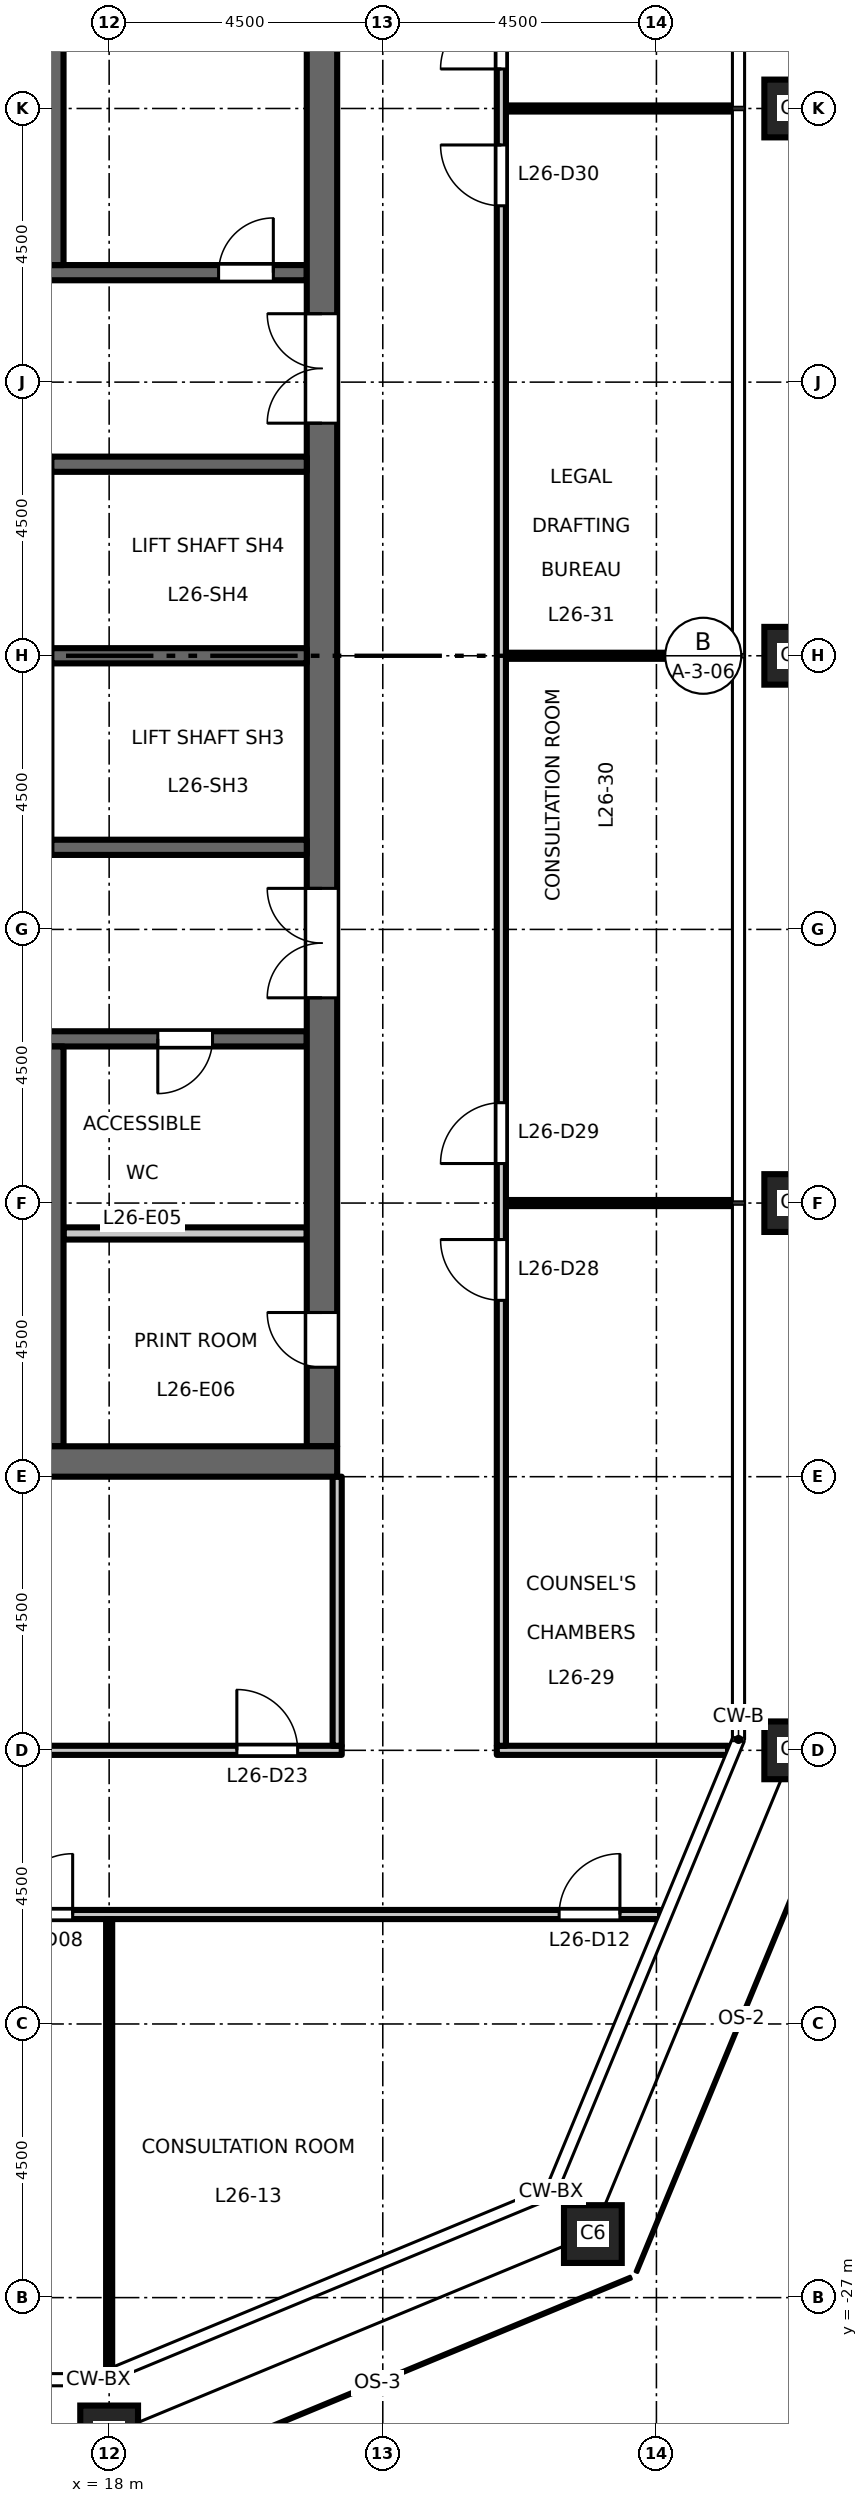
"""IFC4 building model, lengths in metres.
Left out: names, types, materials, properties, quantities, classifications, styles, units other than length and angle.
Written with IfcOpenShell. Run it as: python <this file> out.ifc"""

import sys

from ifc_helpers import new_model, si_unit, direction, frame, frame_2d, origin, origin_2d, place, context, subcontext, project, spatial, rectangle, hollow_rectangle, extrude, element, fill, save


model = new_model("IFC4")
c1 = context("Model", 3, precision=1e-05, world=origin(), true_north=direction((0.0, 1.0)))
c2 = subcontext(c1, "Body", "Model", "MODEL_VIEW")
j1 = project(units=[si_unit("LENGTHUNIT", "METRE"), si_unit("PLANEANGLEUNIT", "RADIAN")], contexts=[c1])
p1 = place(None, origin())
s1 = spatial("IfcSite", under=j1, at=p1, CompositionType="ELEMENT")
p2 = place(p1, origin())
s2 = spatial("IfcBuilding", under=s1, at=p2, CompositionType="ELEMENT")
p3 = place(p2, frame((0.0, 0.0, 122.7)))
s3 = spatial("IfcBuildingStorey", under=s2, at=p3, CompositionType="ELEMENT", Elevation=122.7)
for number, where, z_axis, x_axis in (
    (1, (18.0, -29.25, 0.0), (0.0, 0.0, 1.0), (1.0, 0.0, 0.0)),
    (2, (25.955, -25.955, 0.0), (0.0, 0.0, 1.0), (1.0, 0.0, 0.0)),
    (3, (29.25, -18.0, 0.0), (0.0, 0.0, 1.0), (1.0, 0.0, 0.0)),
    (4, (29.25, -9.0, 0.0), (0.0, 0.0, 1.0), (1.0, 0.0, 0.0)),
    (5, (29.25, 0.0, 0.0), (0.0, 0.0, 1.0), (1.0, 0.0, 0.0)),
    (6, (29.25, 9.0, 0.0), (0.0, 0.0, 1.0), (1.0, 0.0, 0.0)),
):
    element("IfcColumn", number, at=place(p3, frame(where, z_axis=z_axis, x_axis=x_axis)), inside=s3, PredefinedType="COLUMN", context=c2, shape_type="SweptSolid", body=[
        extrude(hollow_rectangle(XDim=0.95, YDim=0.95, WallThickness=0.055, at=origin_2d()), origin(), (0.0, 0.0, 1.0), 4.5),
    ])
p4 = place(p3, frame((17.0, 6.3, 0.0), z_axis=(0.0, 0.0, 1.0), x_axis=(1.0, 0.0, 0.0)))
e7 = element("IfcWall", 7, at=p4, inside=s3, PredefinedType="SHEAR", context=c2, shape_type="SweptSolid", body=[
    extrude(rectangle(XDim=4.25, YDim=0.25, at=frame_2d((2.125, 0.0))), origin(), (0.0, 0.0, 1.0), 4.35),
])
p5 = place(p4, frame((2.8, 0.0, 0.0)))
e8 = element("IfcOpeningElement", 8, at=p5, cuts=e7, PredefinedType="OPENING", context=c2, shape_type="SweptSolid", body=[
    extrude(rectangle(XDim=0.9, YDim=2.1, at=frame_2d((0.45, 1.05))), frame((0.0, 0.135, 0.0), z_axis=(0.0, -1.0, 0.0), x_axis=(1.0, 0.0, 0.0)), (0.0, 0.0, 1.0), 0.27),
])
p6 = place(p3, frame((12.15, -6.3, 0.0), z_axis=(0.0, 0.0, 1.0), x_axis=(1.0, 0.0, 0.0)))
e9 = element("IfcWall", 9, at=p6, inside=s3, PredefinedType="SHEAR", context=c2, shape_type="SweptSolid", body=[
    extrude(rectangle(XDim=9.1, YDim=0.25, at=frame_2d((4.55, 0.0))), origin(), (0.0, 0.0, 1.0), 4.35),
])
p7 = place(p6, frame((1.8, 0.0, 0.0)))
e10 = element("IfcOpeningElement", 10, at=p7, cuts=e9, PredefinedType="OPENING", context=c2, shape_type="SweptSolid", body=[
    extrude(rectangle(XDim=1.0, YDim=2.1, at=frame_2d((0.5, 1.05))), frame((0.0, 0.135, 0.0), z_axis=(0.0, -1.0, 0.0), x_axis=(1.0, 0.0, 0.0)), (0.0, 0.0, 1.0), 0.27),
])
p8 = place(p6, frame((6.65, 0.0, 0.0)))
e11 = element("IfcOpeningElement", 11, at=p8, cuts=e9, PredefinedType="OPENING", context=c2, shape_type="SweptSolid", body=[
    extrude(rectangle(XDim=0.9, YDim=2.1, at=frame_2d((0.45, 1.05))), frame((0.0, 0.135, 0.0), z_axis=(0.0, -1.0, 0.0), x_axis=(1.0, 0.0, 0.0)), (0.0, 0.0, 1.0), 0.27),
])
p9 = place(p3, frame((21.5, -13.0, 0.0), z_axis=(0.0, 0.0, 1.0), x_axis=(0.0, 1.0, 0.0)))
e12 = element("IfcWall", 12, at=p9, inside=s3, PredefinedType="SHEAR", context=c2, shape_type="SweptSolid", body=[
    extrude(rectangle(XDim=26.0, YDim=0.5, at=frame_2d((13.0, 0.0))), origin(), (0.0, 0.0, 1.0), 4.35),
])
p10 = place(p9, frame((16.825, 0.0, 0.0)))
e13 = element("IfcOpeningElement", 13, at=p10, cuts=e12, PredefinedType="OPENING", context=c2, shape_type="SweptSolid", body=[
    extrude(rectangle(XDim=1.8, YDim=2.1, at=frame_2d((0.9, 1.05))), frame((0.0, 0.26, 0.0), z_axis=(0.0, -1.0, 0.0), x_axis=(1.0, 0.0, 0.0)), (0.0, 0.0, 1.0), 0.52),
])
p11 = place(p9, frame((7.375, 0.0, 0.0)))
e14 = element("IfcOpeningElement", 14, at=p11, cuts=e12, PredefinedType="OPENING", context=c2, shape_type="SweptSolid", body=[
    extrude(rectangle(XDim=1.8, YDim=2.1, at=frame_2d((0.9, 1.05))), frame((0.0, 0.26, 0.0), z_axis=(0.0, -1.0, 0.0), x_axis=(1.0, 0.0, 0.0)), (0.0, 0.0, 1.0), 0.52),
])
p12 = place(p9, frame((1.3, 0.0, 0.0)))
e15 = element("IfcOpeningElement", 15, at=p12, cuts=e12, PredefinedType="OPENING", context=c2, shape_type="SweptSolid", body=[
    extrude(rectangle(XDim=0.9, YDim=2.1, at=frame_2d((0.45, 1.05))), frame((0.0, 0.26, 0.0), z_axis=(0.0, -1.0, 0.0), x_axis=(1.0, 0.0, 0.0)), (0.0, 0.0, 1.0), 0.52),
])
p13 = place(p3, frame((17.25, -9.5, 0.0), z_axis=(0.0, 0.0, 1.0), x_axis=(1.0, 0.0, 0.0)))
e16 = element("IfcWall", 16, at=p13, inside=s3, PredefinedType="PARTITIONING", context=c2, shape_type="SweptSolid", body=[
    extrude(rectangle(XDim=4.0, YDim=0.2, at=frame_2d((2.0, 0.0))), origin(), (0.0, 0.0, 1.0), 4.35),
])
for number, where, z_axis, x_axis in (
    (17, (17.05, 0.0, 0.0), (0.0, 0.0, 1.0), (1.0, 0.0, 0.0)),
    (18, (17.05, 3.15, 0.0), (0.0, 0.0, 1.0), (1.0, 0.0, 0.0)),
    (19, (17.05, -3.15, 0.0), (0.0, 0.0, 1.0), (1.0, 0.0, 0.0)),
):
    element("IfcWall", number, at=place(p3, frame(where, z_axis=z_axis, x_axis=x_axis)), inside=s3, PredefinedType="SHEAR", context=c2, shape_type="SweptSolid", body=[
        extrude(rectangle(XDim=4.2, YDim=0.25, at=frame_2d((2.1, 0.0))), origin(), (0.0, 0.0, 1.0), 4.35),
    ])
for number, where, z_axis, x_axis in (
    (20, (17.0, 6.425, 0.0), (0.0, 0.0, 1.0), (0.0, 1.0, 0.0)),
    (21, (17.0, -13.0, 0.0), (0.0, 0.0, 1.0), (0.0, 1.0, 0.0)),
):
    element("IfcWall", number, at=place(p3, frame(where, z_axis=z_axis, x_axis=x_axis)), inside=s3, PredefinedType="SHEAR", context=c2, shape_type="SweptSolid", body=[
        extrude(rectangle(XDim=6.575, YDim=0.5, at=frame_2d((3.288, 0.0))), origin(), (0.0, 0.0, 1.0), 4.35),
    ])
p14 = place(p3, frame((8.25, -13.25, 0.0), z_axis=(0.0, 0.0, 1.0), x_axis=(1.0, 0.0, 0.0)))
e22 = element("IfcWall", 22, at=p14, inside=s3, PredefinedType="SHEAR", context=c2, shape_type="SweptSolid", body=[
    extrude(rectangle(XDim=13.5, YDim=0.5, at=frame_2d((6.75, 0.0))), origin(), (0.0, 0.0, 1.0), 4.35),
])
p15 = place(p3, frame((-27.06, -20.7, 0.0), z_axis=(0.0, 0.0, 1.0), x_axis=(1.0, 0.0, 0.0)))
e23 = element("IfcWall", 23, at=p15, inside=s3, PredefinedType="PARTITIONING", context=c2, shape_type="SweptSolid", body=[
    extrude(rectangle(XDim=54.12, YDim=0.15, at=frame_2d((27.06, 0.0))), origin(), (0.0, 0.0, 1.0), 4.35),
])
p16 = place(p15, frame((9.71, 0.0, 0.0)))
e24 = element("IfcOpeningElement", 24, at=p16, cuts=e23, PredefinedType="OPENING", context=c2, shape_type="SweptSolid", body=[
    extrude(rectangle(XDim=1.0, YDim=2.1, at=frame_2d((0.5, 1.05))), frame((0.0, 0.085, 0.0), z_axis=(0.0, -1.0, 0.0), x_axis=(1.0, 0.0, 0.0)), (0.0, 0.0, 1.0), 0.17),
])
p17 = place(p15, frame((25.46, 0.0, 0.0)))
e25 = element("IfcOpeningElement", 25, at=p17, cuts=e23, PredefinedType="OPENING", context=c2, shape_type="SweptSolid", body=[
    extrude(rectangle(XDim=1.0, YDim=2.1, at=frame_2d((0.5, 1.05))), frame((0.0, 0.085, 0.0), z_axis=(0.0, -1.0, 0.0), x_axis=(1.0, 0.0, 0.0)), (0.0, 0.0, 1.0), 0.17),
])
p18 = place(p15, frame((27.71, 0.0, 0.0)))
e26 = element("IfcOpeningElement", 26, at=p18, cuts=e23, PredefinedType="OPENING", context=c2, shape_type="SweptSolid", body=[
    extrude(rectangle(XDim=1.0, YDim=2.1, at=frame_2d((0.5, 1.05))), frame((0.0, 0.085, 0.0), z_axis=(0.0, -1.0, 0.0), x_axis=(1.0, 0.0, 0.0)), (0.0, 0.0, 1.0), 0.17),
])
p19 = place(p15, frame((43.46, 0.0, 0.0)))
e27 = element("IfcOpeningElement", 27, at=p19, cuts=e23, PredefinedType="OPENING", context=c2, shape_type="SweptSolid", body=[
    extrude(rectangle(XDim=1.0, YDim=2.1, at=frame_2d((0.5, 1.05))), frame((0.0, 0.085, 0.0), z_axis=(0.0, -1.0, 0.0), x_axis=(1.0, 0.0, 0.0)), (0.0, 0.0, 1.0), 0.17),
])
p20 = place(p15, frame((0.65, 0.0, 0.0)))
e28 = element("IfcOpeningElement", 28, at=p20, cuts=e23, PredefinedType="OPENING", context=c2, shape_type="SweptSolid", body=[
    extrude(rectangle(XDim=1.0, YDim=2.1, at=frame_2d((0.5, 1.05))), frame((0.0, 0.085, 0.0), z_axis=(0.0, -1.0, 0.0), x_axis=(1.0, 0.0, 0.0)), (0.0, 0.0, 1.0), 0.17),
])
p21 = place(p15, frame((52.46, 0.0, 0.0)))
e29 = element("IfcOpeningElement", 29, at=p21, cuts=e23, PredefinedType="OPENING", context=c2, shape_type="SweptSolid", body=[
    extrude(rectangle(XDim=1.0, YDim=2.1, at=frame_2d((0.5, 1.05))), frame((0.0, 0.085, 0.0), z_axis=(0.0, -1.0, 0.0), x_axis=(1.0, 0.0, 0.0)), (0.0, 0.0, 1.0), 0.17),
])
p22 = place(p3, frame((-21.825, -18.0, 0.0), z_axis=(0.0, 0.0, 1.0), x_axis=(1.0, 0.0, 0.0)))
e30 = element("IfcWall", 30, at=p22, inside=s3, PredefinedType="PARTITIONING", context=c2, shape_type="SweptSolid", body=[
    extrude(rectangle(XDim=43.65, YDim=0.15, at=frame_2d((21.825, 0.0))), origin(), (0.0, 0.0, 1.0), 4.35),
])
p23 = place(p22, frame((14.175, 0.0, 0.0)))
e31 = element("IfcOpeningElement", 31, at=p23, cuts=e30, PredefinedType="OPENING", context=c2, shape_type="SweptSolid", body=[
    extrude(rectangle(XDim=1.0, YDim=2.1, at=frame_2d((0.5, 1.05))), frame((0.0, 0.085, 0.0), z_axis=(0.0, -1.0, 0.0), x_axis=(1.0, 0.0, 0.0)), (0.0, 0.0, 1.0), 0.17),
])
p24 = place(p22, frame((28.425, 0.0, 0.0)))
e32 = element("IfcOpeningElement", 32, at=p24, cuts=e30, PredefinedType="OPENING", context=c2, shape_type="SweptSolid", body=[
    extrude(rectangle(XDim=1.0, YDim=2.1, at=frame_2d((0.5, 1.05))), frame((0.0, 0.085, 0.0), z_axis=(0.0, -1.0, 0.0), x_axis=(1.0, 0.0, 0.0)), (0.0, 0.0, 1.0), 0.17),
])
p25 = place(p22, frame((0.675, 0.0, 0.0)))
e33 = element("IfcOpeningElement", 33, at=p25, cuts=e30, PredefinedType="OPENING", context=c2, shape_type="SweptSolid", body=[
    extrude(rectangle(XDim=1.0, YDim=2.1, at=frame_2d((0.5, 1.05))), frame((0.0, 0.085, 0.0), z_axis=(0.0, -1.0, 0.0), x_axis=(1.0, 0.0, 0.0)), (0.0, 0.0, 1.0), 0.17),
])
p26 = place(p22, frame((41.925, 0.0, 0.0)))
e34 = element("IfcOpeningElement", 34, at=p26, cuts=e30, PredefinedType="OPENING", context=c2, shape_type="SweptSolid", body=[
    extrude(rectangle(XDim=1.0, YDim=2.1, at=frame_2d((0.5, 1.05))), frame((0.0, 0.085, 0.0), z_axis=(0.0, -1.0, 0.0), x_axis=(1.0, 0.0, 0.0)), (0.0, 0.0, 1.0), 0.17),
])
p27 = place(p3, frame((24.375, -18.0, 0.0), z_axis=(0.0, 0.0, 1.0), x_axis=(1.0, 0.0, 0.0)))
e35 = element("IfcWall", 35, at=p27, inside=s3, PredefinedType="PARTITIONING", context=c2, shape_type="SweptSolid", body=[
    extrude(rectangle(XDim=3.803, YDim=0.15, at=frame_2d((1.901, 0.0))), origin(), (0.0, 0.0, 1.0), 4.35),
])
for number, where, z_axis, x_axis in (
    (36, (24.525, -9.0, 0.0), (0.0, 0.0, 1.0), (1.0, 0.0, 0.0)),
    (37, (24.525, 0.0, 0.0), (0.0, 0.0, 1.0), (1.0, 0.0, 0.0)),
    (38, (24.525, 9.0, 0.0), (0.0, 0.0, 1.0), (1.0, 0.0, 0.0)),
):
    element("IfcWall", number, at=place(p3, frame(where, z_axis=z_axis, x_axis=x_axis)), inside=s3, PredefinedType="PARTITIONING", context=c2, shape_type="SweptSolid", body=[
        extrude(rectangle(XDim=3.735, YDim=0.1, at=frame_2d((1.868, 0.0))), origin(), (0.0, 0.0, 1.0), 4.35),
    ])
p28 = place(p3, frame((18.0, -28.178, 0.0), z_axis=(0.0, 0.0, 1.0), x_axis=(0.0, 1.0, 0.0)))
e39 = element("IfcWall", 39, at=p28, inside=s3, PredefinedType="PARTITIONING", context=c2, shape_type="SweptSolid", body=[
    extrude(rectangle(XDim=7.403, YDim=0.1, at=frame_2d((3.702, 0.0))), origin(), (0.0, 0.0, 1.0), 3.45),
])
p29 = place(p3, frame((21.75, -17.925, 0.0), z_axis=(0.0, 0.0, 1.0), x_axis=(0.0, 1.0, 0.0)))
e40 = element("IfcWall", 40, at=p29, inside=s3, PredefinedType="PARTITIONING", context=c2, shape_type="SweptSolid", body=[
    extrude(rectangle(XDim=4.425, YDim=0.15, at=frame_2d((2.212, 0.0))), origin(), (0.0, 0.0, 1.0), 4.35),
])
p30 = place(p3, frame((24.45, -17.925, 0.0), z_axis=(0.0, 0.0, 1.0), x_axis=(0.0, 1.0, 0.0)))
e41 = element("IfcWall", 41, at=p30, inside=s3, PredefinedType="PARTITIONING", context=c2, shape_type="SweptSolid", body=[
    extrude(rectangle(XDim=35.85, YDim=0.15, at=frame_2d((17.925, 0.0))), origin(), (0.0, 0.0, 1.0), 4.35),
])
p31 = place(p30, frame((7.325, 0.0, 0.0)))
e42 = element("IfcOpeningElement", 42, at=p31, cuts=e41, PredefinedType="OPENING", context=c2, shape_type="SweptSolid", body=[
    extrude(rectangle(XDim=1.0, YDim=2.1, at=frame_2d((0.5, 1.05))), frame((0.0, 0.085, 0.0), z_axis=(0.0, -1.0, 0.0), x_axis=(1.0, 0.0, 0.0)), (0.0, 0.0, 1.0), 0.17),
])
p32 = place(p30, frame((9.575, 0.0, 0.0)))
e43 = element("IfcOpeningElement", 43, at=p32, cuts=e41, PredefinedType="OPENING", context=c2, shape_type="SweptSolid", body=[
    extrude(rectangle(XDim=1.0, YDim=2.1, at=frame_2d((0.5, 1.05))), frame((0.0, 0.085, 0.0), z_axis=(0.0, -1.0, 0.0), x_axis=(1.0, 0.0, 0.0)), (0.0, 0.0, 1.0), 0.17),
])
p33 = place(p30, frame((25.325, 0.0, 0.0)))
e44 = element("IfcOpeningElement", 44, at=p33, cuts=e41, PredefinedType="OPENING", context=c2, shape_type="SweptSolid", body=[
    extrude(rectangle(XDim=1.0, YDim=2.1, at=frame_2d((0.5, 1.05))), frame((0.0, 0.085, 0.0), z_axis=(0.0, -1.0, 0.0), x_axis=(1.0, 0.0, 0.0)), (0.0, 0.0, 1.0), 0.17),
])
p34 = place(p30, frame((27.575, 0.0, 0.0)))
e45 = element("IfcOpeningElement", 45, at=p34, cuts=e41, PredefinedType="OPENING", context=c2, shape_type="SweptSolid", body=[
    extrude(rectangle(XDim=1.0, YDim=2.1, at=frame_2d((0.5, 1.05))), frame((0.0, 0.085, 0.0), z_axis=(0.0, -1.0, 0.0), x_axis=(1.0, 0.0, 0.0)), (0.0, 0.0, 1.0), 0.17),
])
p35 = place(p10, origin())
e46 = element("IfcDoor", 46, at=p35, inside=s3, OperationType="DOUBLE_DOOR_DOUBLE_SWING", PredefinedType="DOOR", context=c2, shape_type="SweptSolid", body=[
    extrude(rectangle(XDim=1.8, YDim=2.1, at=frame_2d((0.9, 1.05))), frame((0.0, 0.025, 0.0), z_axis=(0.0, -1.0, 0.0), x_axis=(1.0, 0.0, 0.0)), (0.0, 0.0, 1.0), 0.05),
])
fill(e13, e46)
p36 = place(p11, origin())
e47 = element("IfcDoor", 47, at=p36, inside=s3, OperationType="DOUBLE_DOOR_DOUBLE_SWING", PredefinedType="DOOR", context=c2, shape_type="SweptSolid", body=[
    extrude(rectangle(XDim=1.8, YDim=2.1, at=frame_2d((0.9, 1.05))), frame((0.0, 0.025, 0.0), z_axis=(0.0, -1.0, 0.0), x_axis=(1.0, 0.0, 0.0)), (0.0, 0.0, 1.0), 0.05),
])
fill(e14, e47)
p37 = place(p5, origin())
e48 = element("IfcDoor", 48, at=p37, inside=s3, OperationType="SINGLE_SWING_LEFT", PredefinedType="DOOR", context=c2, shape_type="SweptSolid", body=[
    extrude(rectangle(XDim=0.9, YDim=2.1, at=frame_2d((0.45, 1.05))), frame((0.0, 0.025, 0.0), z_axis=(0.0, -1.0, 0.0), x_axis=(1.0, 0.0, 0.0)), (0.0, 0.0, 1.0), 0.05),
])
fill(e8, e48)
p38 = place(p8, origin())
e49 = element("IfcDoor", 49, at=p38, inside=s3, OperationType="SINGLE_SWING_LEFT", PredefinedType="DOOR", context=c2, shape_type="SweptSolid", body=[
    extrude(rectangle(XDim=0.9, YDim=2.1, at=frame_2d((0.45, 1.05))), frame((0.0, 0.025, 0.0), z_axis=(0.0, -1.0, 0.0), x_axis=(1.0, 0.0, 0.0)), (0.0, 0.0, 1.0), 0.05),
])
fill(e11, e49)
p39 = place(p12, origin())
e50 = element("IfcDoor", 50, at=p39, inside=s3, OperationType="SINGLE_SWING_LEFT", PredefinedType="DOOR", context=c2, shape_type="SweptSolid", body=[
    extrude(rectangle(XDim=0.9, YDim=2.1, at=frame_2d((0.45, 1.05))), frame((0.0, 0.025, 0.0), z_axis=(0.0, -1.0, 0.0), x_axis=(1.0, 0.0, 0.0)), (0.0, 0.0, 1.0), 0.05),
])
fill(e15, e50)
p40 = place(p19, origin())
e51 = element("IfcDoor", 51, at=p40, inside=s3, OperationType="SINGLE_SWING_RIGHT", PredefinedType="DOOR", context=c2, shape_type="SweptSolid", body=[
    extrude(rectangle(XDim=1.0, YDim=2.1, at=frame_2d((0.5, 1.05))), frame((0.0, 0.025, 0.0), z_axis=(0.0, -1.0, 0.0), x_axis=(1.0, 0.0, 0.0)), (0.0, 0.0, 1.0), 0.05),
])
fill(e27, e51)
p41 = place(p21, origin())
e52 = element("IfcDoor", 52, at=p41, inside=s3, OperationType="SINGLE_SWING_RIGHT", PredefinedType="DOOR", context=c2, shape_type="SweptSolid", body=[
    extrude(rectangle(XDim=1.0, YDim=2.1, at=frame_2d((0.5, 1.05))), frame((0.0, 0.025, 0.0), z_axis=(0.0, -1.0, 0.0), x_axis=(1.0, 0.0, 0.0)), (0.0, 0.0, 1.0), 0.05),
])
fill(e29, e52)
p42 = place(p26, origin())
e53 = element("IfcDoor", 53, at=p42, inside=s3, OperationType="SINGLE_SWING_LEFT", PredefinedType="DOOR", context=c2, shape_type="SweptSolid", body=[
    extrude(rectangle(XDim=1.0, YDim=2.1, at=frame_2d((0.5, 1.05))), frame((0.0, 0.025, 0.0), z_axis=(0.0, -1.0, 0.0), x_axis=(1.0, 0.0, 0.0)), (0.0, 0.0, 1.0), 0.05),
])
fill(e34, e53)
p43 = place(p31, origin())
e54 = element("IfcDoor", 54, at=p43, inside=s3, OperationType="SINGLE_SWING_RIGHT", PredefinedType="DOOR", context=c2, shape_type="SweptSolid", body=[
    extrude(rectangle(XDim=1.0, YDim=2.1, at=frame_2d((0.5, 1.05))), frame((0.0, 0.025, 0.0), z_axis=(0.0, -1.0, 0.0), x_axis=(1.0, 0.0, 0.0)), (0.0, 0.0, 1.0), 0.05),
])
fill(e42, e54)
p44 = place(p32, origin())
e55 = element("IfcDoor", 55, at=p44, inside=s3, OperationType="SINGLE_SWING_LEFT", PredefinedType="DOOR", context=c2, shape_type="SweptSolid", body=[
    extrude(rectangle(XDim=1.0, YDim=2.1, at=frame_2d((0.5, 1.05))), frame((0.0, 0.025, 0.0), z_axis=(0.0, -1.0, 0.0), x_axis=(1.0, 0.0, 0.0)), (0.0, 0.0, 1.0), 0.05),
])
fill(e43, e55)
p45 = place(p33, origin())
e56 = element("IfcDoor", 56, at=p45, inside=s3, OperationType="SINGLE_SWING_RIGHT", PredefinedType="DOOR", context=c2, shape_type="SweptSolid", body=[
    extrude(rectangle(XDim=1.0, YDim=2.1, at=frame_2d((0.5, 1.05))), frame((0.0, 0.025, 0.0), z_axis=(0.0, -1.0, 0.0), x_axis=(1.0, 0.0, 0.0)), (0.0, 0.0, 1.0), 0.05),
])
fill(e44, e56)
p46 = place(p34, origin())
e57 = element("IfcDoor", 57, at=p46, inside=s3, OperationType="SINGLE_SWING_LEFT", PredefinedType="DOOR", context=c2, shape_type="SweptSolid", body=[
    extrude(rectangle(XDim=1.0, YDim=2.1, at=frame_2d((0.5, 1.05))), frame((0.0, 0.025, 0.0), z_axis=(0.0, -1.0, 0.0), x_axis=(1.0, 0.0, 0.0)), (0.0, 0.0, 1.0), 0.05),
])
fill(e45, e57)
save(model, sys.argv[1])
